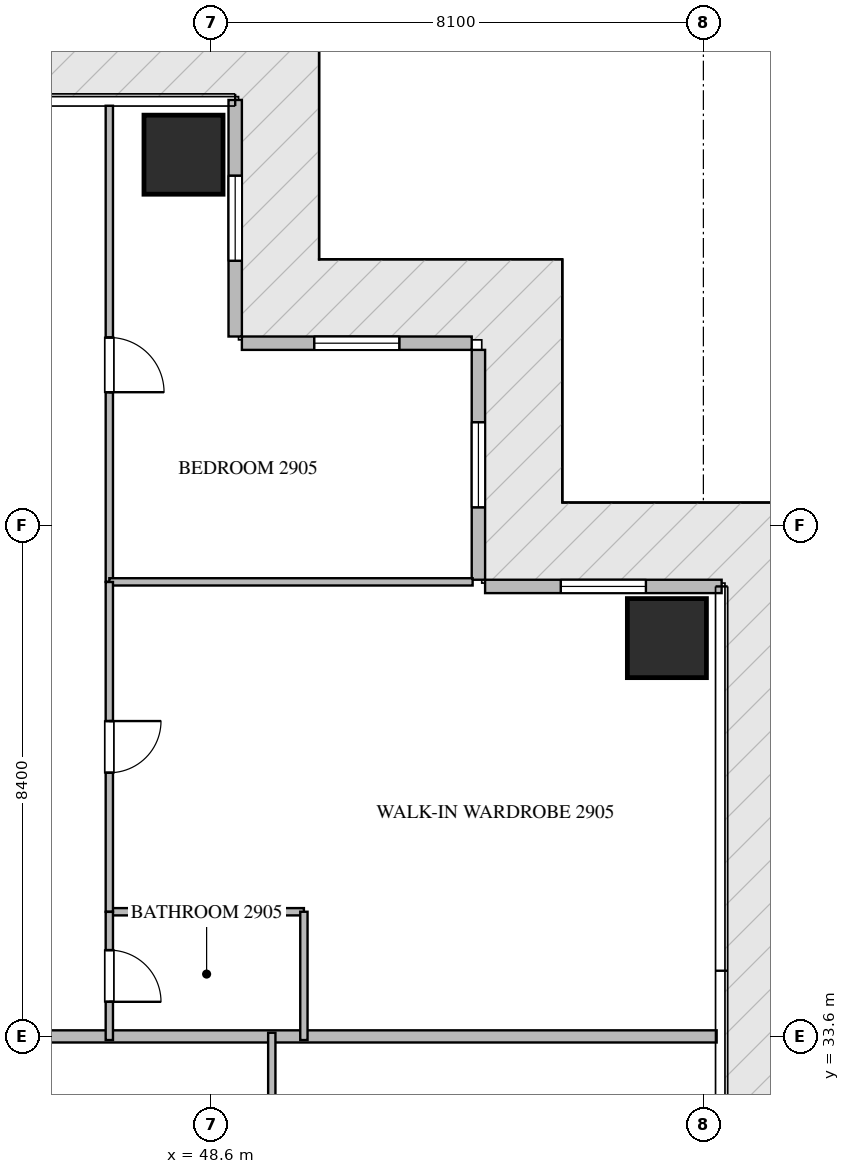
"""IFC4 building model, lengths in metres.
Left out: names, types, materials, properties, quantities, classifications, styles, units other than length and angle.
Written with IfcOpenShell. Run it as: python <this file> out.ifc"""

import sys

from ifc_helpers import new_model, si_unit, direction, frame, frame_2d, origin, origin_2d, place, context, subcontext, project, spatial, rectangle, extrude, source, transform, mapped, element, fill, save


model = new_model("IFC4")
c1 = context("Model", 3, precision=1e-05, world=origin(), true_north=direction((0.0, 1.0)))
c2 = subcontext(c1, "Body", "Model", "MODEL_VIEW")
j1 = project(units=[si_unit("LENGTHUNIT", "METRE"), si_unit("PLANEANGLEUNIT", "RADIAN")], contexts=[c1])
p1 = place(None, origin())
s1 = spatial("IfcSite", under=j1, at=p1, CompositionType="ELEMENT")
p2 = place(p1, origin())
s2 = spatial("IfcBuilding", under=s1, at=p2, CompositionType="ELEMENT")
p3 = place(p2, frame((0.0, 0.0, 120.15)))
s3 = spatial("IfcBuildingStorey", under=s2, at=p3, CompositionType="ELEMENT", Elevation=120.15)
m1 = source(origin(), c2, "Body", "SweptSolid", [
    extrude(rectangle(XDim=1.3, YDim=1.3, at=origin_2d()), origin(), (0.0, 0.0, 1.0), 3.93),
])
for number, where, z_axis, x_axis in (
    (1, (48.15, 48.1, -0.44), (0.0, 0.0, 1.0), (1.0, 0.0, 0.0)),
    (2, (56.1, 40.15, -0.44), (0.0, 0.0, 1.0), (1.0, 0.0, 0.0)),
):
    element("IfcColumn", number, at=place(p3, frame(where, z_axis=z_axis, x_axis=x_axis)), inside=s3, PredefinedType="COLUMN", context=c2, shape_type="MappedRepresentation", body=[
        mapped(m1, transform((0.0, 0.0, 0.0), scale=1.0)),
    ])
p4 = place(p3, frame((57.0, 41.0, 0.0), z_axis=(0.0, 0.0, 1.0), x_axis=(-1.0, 0.0, 0.0)))
e3 = element("IfcWall", 3, at=p4, inside=s3, PredefinedType="ELEMENTEDWALL", context=c2, shape_type="SweptSolid", body=[
    extrude(rectangle(XDim=3.89, YDim=0.22, at=frame_2d((1.945, 0.0))), origin(), (0.0, 0.0, 1.0), 3.475),
])
p5 = place(p4, frame((1.245, 0.0, 0.65)))
e4 = element("IfcOpeningElement", 4, at=p5, cuts=e3, PredefinedType="OPENING", context=c2, shape_type="SweptSolid", body=[
    extrude(rectangle(XDim=1.4, YDim=2.05, at=frame_2d((0.7, 1.025))), frame((0.0, 0.12, 0.0), z_axis=(0.0, -1.0, 0.0), x_axis=(1.0, 0.0, 0.0)), (0.0, 0.0, 1.0), 0.24),
])
p6 = place(p3, frame((53.0, 41.11, 0.0), z_axis=(0.0, 0.0, 1.0), x_axis=(0.0, 1.0, 0.0)))
e5 = element("IfcWall", 5, at=p6, inside=s3, PredefinedType="ELEMENTEDWALL", context=c2, shape_type="SweptSolid", body=[
    extrude(rectangle(XDim=3.78, YDim=0.22, at=frame_2d((1.89, 0.0))), origin(), (0.0, 0.0, 1.0), 3.475),
])
p7 = place(p6, frame((1.19, 0.0, 0.65)))
e6 = element("IfcOpeningElement", 6, at=p7, cuts=e5, PredefinedType="OPENING", context=c2, shape_type="SweptSolid", body=[
    extrude(rectangle(XDim=1.4, YDim=2.05, at=frame_2d((0.7, 1.025))), frame((0.0, 0.12, 0.0), z_axis=(0.0, -1.0, 0.0), x_axis=(1.0, 0.0, 0.0)), (0.0, 0.0, 1.0), 0.24),
])
p8 = place(p3, frame((52.89, 45.0, 0.0), z_axis=(0.0, 0.0, 1.0), x_axis=(-1.0, 0.0, 0.0)))
e7 = element("IfcWall", 7, at=p8, inside=s3, PredefinedType="ELEMENTEDWALL", context=c2, shape_type="SweptSolid", body=[
    extrude(rectangle(XDim=3.78, YDim=0.22, at=frame_2d((1.89, 0.0))), origin(), (0.0, 0.0, 1.0), 3.475),
])
p9 = place(p8, frame((1.19, 0.0, 0.65)))
e8 = element("IfcOpeningElement", 8, at=p9, cuts=e7, PredefinedType="OPENING", context=c2, shape_type="SweptSolid", body=[
    extrude(rectangle(XDim=1.4, YDim=2.05, at=frame_2d((0.7, 1.025))), frame((0.0, 0.12, 0.0), z_axis=(0.0, -1.0, 0.0), x_axis=(1.0, 0.0, 0.0)), (0.0, 0.0, 1.0), 0.24),
])
p10 = place(p3, frame((49.0, 45.11, 0.0), z_axis=(0.0, 0.0, 1.0), x_axis=(0.0, 1.0, 0.0)))
e9 = element("IfcWall", 9, at=p10, inside=s3, PredefinedType="ELEMENTEDWALL", context=c2, shape_type="SweptSolid", body=[
    extrude(rectangle(XDim=3.89, YDim=0.22, at=frame_2d((1.945, 0.0))), origin(), (0.0, 0.0, 1.0), 3.475),
])
p11 = place(p10, frame((1.245, 0.0, 0.65)))
e10 = element("IfcOpeningElement", 10, at=p11, cuts=e9, PredefinedType="OPENING", context=c2, shape_type="SweptSolid", body=[
    extrude(rectangle(XDim=1.4, YDim=2.05, at=frame_2d((0.7, 1.025))), frame((0.0, 0.12, 0.0), z_axis=(0.0, -1.0, 0.0), x_axis=(1.0, 0.0, 0.0)), (0.0, 0.0, 1.0), 0.24),
])
p12 = place(p3, frame((43.85, 33.6, 0.0), z_axis=(0.0, 0.0, 1.0), x_axis=(1.0, 0.0, 0.0)))
e11 = element("IfcWall", 11, at=p12, inside=s3, PredefinedType="PARTITIONING", context=c2, shape_type="SweptSolid", body=[
    extrude(rectangle(XDim=13.068, YDim=0.2, at=frame_2d((6.534, 0.0))), origin(), (0.0, 0.0, 1.0), 3.49),
])
p13 = place(p3, frame((46.93, 48.905, 0.0), z_axis=(0.0, 0.0, 1.0), x_axis=(0.0, -1.0, 0.0)))
e12 = element("IfcWall", 12, at=p13, inside=s3, PredefinedType="PARTITIONING", context=c2, shape_type="SweptSolid", body=[
    extrude(rectangle(XDim=7.83, YDim=0.12, at=frame_2d((3.915, 0.0))), origin(), (0.0, 0.0, 1.0), 3.49),
])
p14 = place(p13, frame((3.811, 0.0, 0.0)))
e13 = element("IfcOpeningElement", 13, at=p14, cuts=e12, PredefinedType="OPENING", context=c2, shape_type="SweptSolid", body=[
    extrude(rectangle(XDim=0.9, YDim=2.1, at=frame_2d((0.45, 1.05))), frame((0.0, 0.07, 0.0), z_axis=(0.0, -1.0, 0.0), x_axis=(1.0, 0.0, 0.0)), (0.0, 0.0, 1.0), 0.14),
])
p15 = place(p3, frame((46.93, 41.075, 0.0), z_axis=(0.0, 0.0, 1.0), x_axis=(1.0, 0.0, 0.0)))
e14 = element("IfcWall", 14, at=p15, inside=s3, PredefinedType="PARTITIONING", context=c2, shape_type="SweptSolid", body=[
    extrude(rectangle(XDim=5.975, YDim=0.12, at=frame_2d((2.988, 0.0))), origin(), (0.0, 0.0, 1.0), 3.49),
])
p16 = place(p3, frame((46.93, 35.65, 0.0), z_axis=(0.0, 0.0, 1.0), x_axis=(1.0, 0.0, 0.0)))
e15 = element("IfcWall", 15, at=p16, inside=s3, PredefinedType="PARTITIONING", context=c2, shape_type="SweptSolid", body=[
    extrude(rectangle(XDim=3.2, YDim=0.12, at=frame_2d((1.6, 0.0))), origin(), (0.0, 0.0, 1.0), 3.49),
])
p17 = place(p3, frame((50.13, 35.65, 0.0), z_axis=(0.0, 0.0, 1.0), x_axis=(0.0, -1.0, 0.0)))
e16 = element("IfcWall", 16, at=p17, inside=s3, PredefinedType="PARTITIONING", context=c2, shape_type="SweptSolid", body=[
    extrude(rectangle(XDim=2.11, YDim=0.12, at=frame_2d((1.055, 0.0))), origin(), (0.0, 0.0, 1.0), 3.49),
])
p18 = place(p3, frame((46.93, 41.073, 0.0), z_axis=(0.0, 0.0, 1.0), x_axis=(0.0, -1.0, 0.0)))
e17 = element("IfcWall", 17, at=p18, inside=s3, PredefinedType="PARTITIONING", context=c2, shape_type="SweptSolid", body=[
    extrude(rectangle(XDim=5.423, YDim=0.12, at=frame_2d((2.711, 0.0))), origin(), (0.0, 0.0, 1.0), 3.49),
])
p19 = place(p18, frame((2.287, 0.0, 0.0)))
e18 = element("IfcOpeningElement", 18, at=p19, cuts=e17, PredefinedType="OPENING", context=c2, shape_type="SweptSolid", body=[
    extrude(rectangle(XDim=0.85, YDim=2.1, at=frame_2d((0.425, 1.05))), frame((0.0, 0.07, 0.0), z_axis=(0.0, -1.0, 0.0), x_axis=(1.0, 0.0, 0.0)), (0.0, 0.0, 1.0), 0.14),
])
p20 = place(p3, frame((46.93, 35.648, 0.0), z_axis=(0.0, 0.0, 1.0), x_axis=(0.0, -1.0, 0.0)))
e19 = element("IfcWall", 19, at=p20, inside=s3, PredefinedType="PARTITIONING", context=c2, shape_type="SweptSolid", body=[
    extrude(rectangle(XDim=2.108, YDim=0.12, at=frame_2d((1.054, 0.0))), origin(), (0.0, 0.0, 1.0), 3.49),
])
p21 = place(p20, frame((0.629, 0.0, 0.0)))
e20 = element("IfcOpeningElement", 20, at=p21, cuts=e19, PredefinedType="OPENING", context=c2, shape_type="SweptSolid", body=[
    extrude(rectangle(XDim=0.85, YDim=2.1, at=frame_2d((0.425, 1.05))), frame((0.0, 0.07, 0.0), z_axis=(0.0, -1.0, 0.0), x_axis=(1.0, 0.0, 0.0)), (0.0, 0.0, 1.0), 0.14),
])
p22 = place(p3, frame((49.602, 27.8, 0.0), z_axis=(0.0, 0.0, 1.0), x_axis=(0.0, 1.0, 0.0)))
e21 = element("IfcWall", 21, at=p22, inside=s3, PredefinedType="PARTITIONING", context=c2, shape_type="SweptSolid", body=[
    extrude(rectangle(XDim=5.86, YDim=0.12, at=frame_2d((2.93, 0.0))), origin(), (0.0, 0.0, 1.0), 3.49),
])
m2 = source(origin(), c2, "Body", "SweptSolid", [
    extrude(rectangle(XDim=1.4, YDim=2.05, at=frame_2d((0.7, 1.025))), frame((0.0, 0.03, 0.0), z_axis=(0.0, -1.0, 0.0), x_axis=(1.0, 0.0, 0.0)), (0.0, 0.0, 1.0), 0.06),
])
p23 = place(p5, origin())
e22 = element("IfcWindow", 22, at=p23, inside=s3, PartitioningType="SINGLE_PANEL", PredefinedType="WINDOW", context=c2, shape_type="MappedRepresentation", body=[
    mapped(m2, transform((0.0, 0.0, 0.0), scale=1.0)),
])
fill(e4, e22)
p24 = place(p7, origin())
e23 = element("IfcWindow", 23, at=p24, inside=s3, PartitioningType="SINGLE_PANEL", PredefinedType="WINDOW", context=c2, shape_type="MappedRepresentation", body=[
    mapped(m2, transform((0.0, 0.0, 0.0), scale=1.0)),
])
fill(e6, e23)
p25 = place(p9, origin())
e24 = element("IfcWindow", 24, at=p25, inside=s3, PartitioningType="SINGLE_PANEL", PredefinedType="WINDOW", context=c2, shape_type="MappedRepresentation", body=[
    mapped(m2, transform((0.0, 0.0, 0.0), scale=1.0)),
])
fill(e8, e24)
p26 = place(p11, origin())
e25 = element("IfcWindow", 25, at=p26, inside=s3, PartitioningType="SINGLE_PANEL", PredefinedType="WINDOW", context=c2, shape_type="MappedRepresentation", body=[
    mapped(m2, transform((0.0, 0.0, 0.0), scale=1.0)),
])
fill(e10, e25)
m3 = source(origin(), c2, "Body", "SweptSolid", [
    extrude(rectangle(XDim=0.9, YDim=2.1, at=frame_2d((0.45, 1.05))), frame((0.0, 0.025, 0.0), z_axis=(0.0, -1.0, 0.0), x_axis=(1.0, 0.0, 0.0)), (0.0, 0.0, 1.0), 0.05),
])
p27 = place(p14, origin())
e26 = element("IfcDoor", 26, at=p27, inside=s3, OperationType="SINGLE_SWING_RIGHT", PredefinedType="DOOR", context=c2, shape_type="MappedRepresentation", body=[
    mapped(m3, transform((0.0, 0.0, 0.0), scale=1.0)),
])
fill(e13, e26)
m4 = source(origin(), c2, "Body", "SweptSolid", [
    extrude(rectangle(XDim=0.85, YDim=2.1, at=frame_2d((0.425, 1.05))), frame((0.0, 0.025, 0.0), z_axis=(0.0, -1.0, 0.0), x_axis=(1.0, 0.0, 0.0)), (0.0, 0.0, 1.0), 0.05),
])
p28 = place(p19, origin())
e27 = element("IfcDoor", 27, at=p28, inside=s3, OperationType="SINGLE_SWING_LEFT", PredefinedType="DOOR", context=c2, shape_type="MappedRepresentation", body=[
    mapped(m4, transform((0.0, 0.0, 0.0), scale=1.0)),
])
fill(e18, e27)
p29 = place(p21, origin())
e28 = element("IfcDoor", 28, at=p29, inside=s3, OperationType="SINGLE_SWING_RIGHT", PredefinedType="DOOR", context=c2, shape_type="MappedRepresentation", body=[
    mapped(m4, transform((0.0, 0.0, 0.0), scale=1.0)),
])
fill(e20, e28)
save(model, sys.argv[1])
